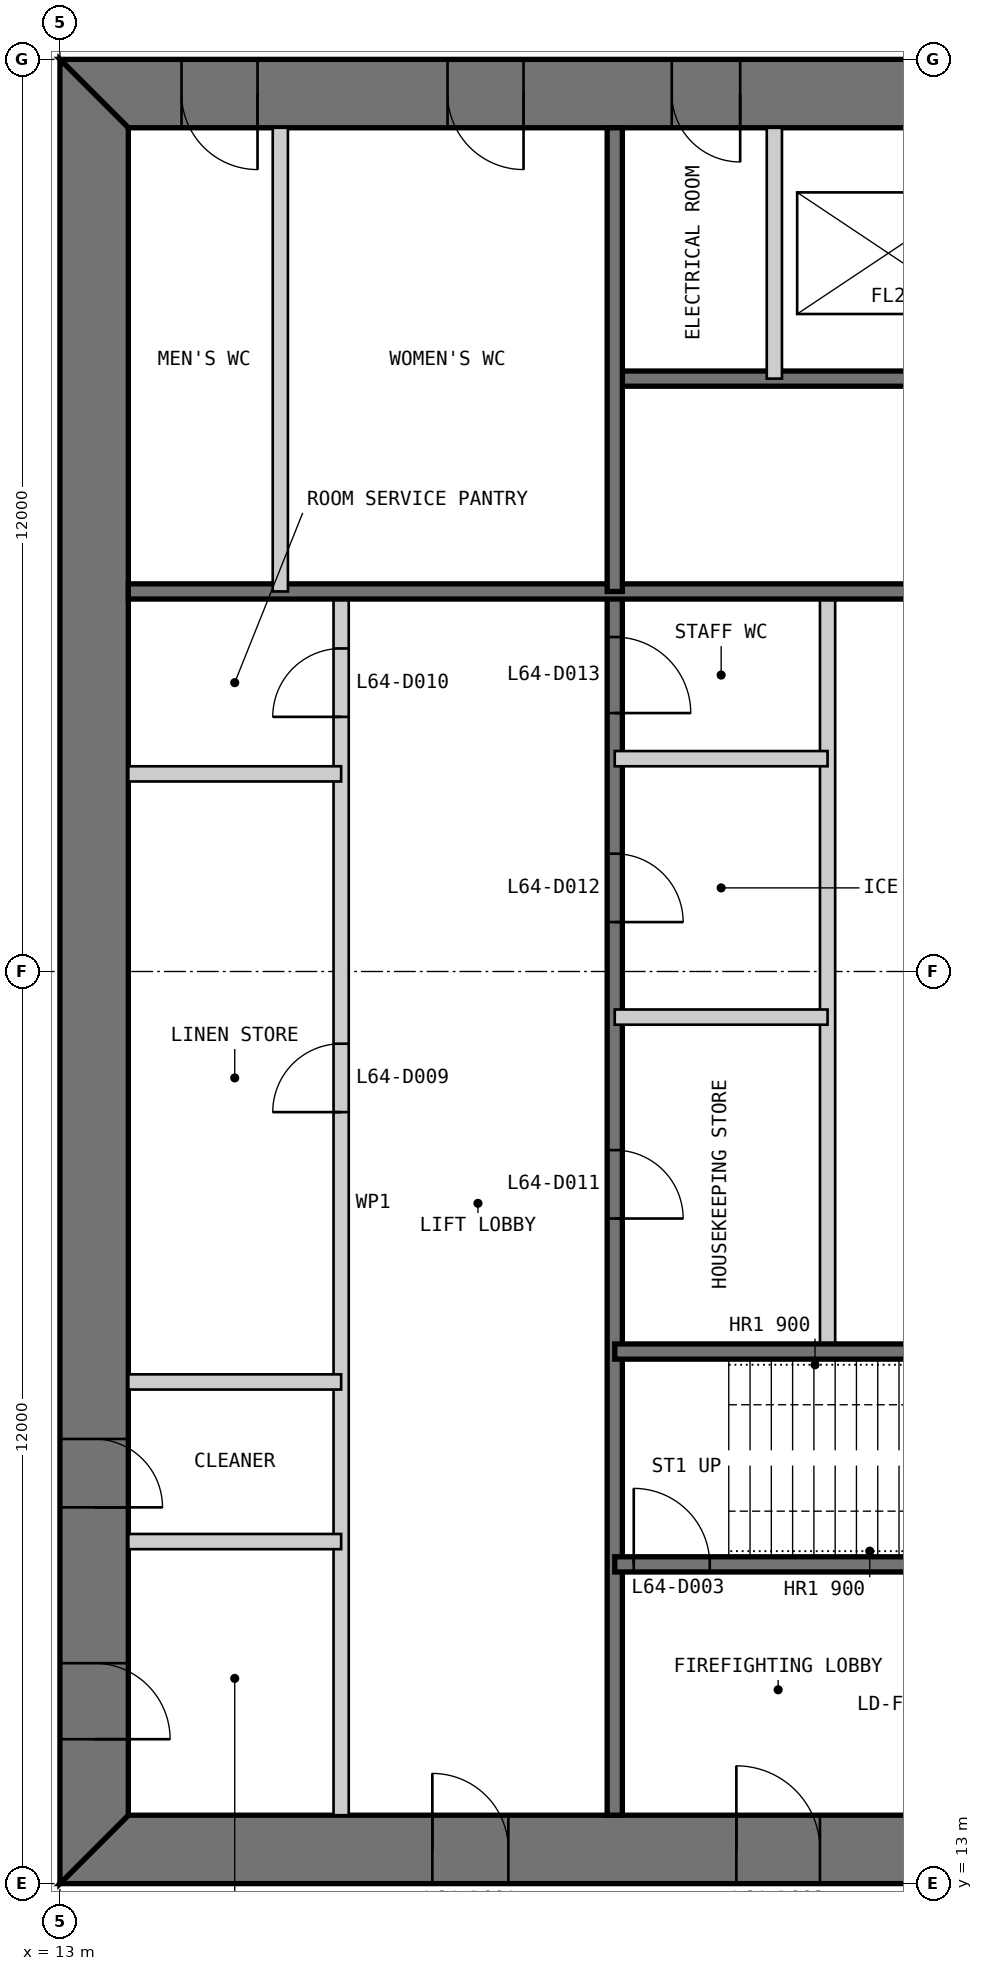
"""IFC4 building model, lengths in metres.
Left out: names, types, materials, properties, quantities, classifications, styles, units other than length and angle.
Written with IfcOpenShell. Run it as: python <this file> out.ifc"""

import sys

from ifc_helpers import new_model, si_unit, direction, frame, frame_2d, origin, place, context, subcontext, project, spatial, polyline, rectangle, outline, extrude, element, fill, save


model = new_model("IFC4")
c1 = context("Model", 3, precision=1e-05, world=origin(), true_north=direction((0.0, 1.0)))
c2 = subcontext(c1, "Body", "Model", "MODEL_VIEW")
j1 = project(units=[si_unit("LENGTHUNIT", "METRE"), si_unit("PLANEANGLEUNIT", "RADIAN")], contexts=[c1])
p1 = place(None, origin())
s1 = spatial("IfcSite", under=j1, at=p1, CompositionType="ELEMENT")
p2 = place(p1, origin())
s2 = spatial("IfcBuilding", under=s1, at=p2, CompositionType="ELEMENT")
p3 = place(p2, frame((0.0, 0.0, 269.6)))
s3 = spatial("IfcBuildingStorey", under=s2, at=p3, CompositionType="ELEMENT", Elevation=269.6)
p4 = place(p3, frame((13.0, 13.45, 0.0), z_axis=(0.0, 0.0, 1.0), x_axis=(1.0, 0.0, 0.0)))
e1 = element("IfcWall", 1, at=p4, inside=s3, PredefinedType="SHEAR", context=c2, shape_type="SweptSolid", body=[
    extrude(outline(polyline([(0.0, -0.45), (24.0, -0.45), (23.1, 0.45), (0.9, 0.45), (0.0, -0.45)])), origin(), (0.0, 0.0, 1.0), 3.4),
])
p5 = place(p4, frame((4.9, 0.0, 0.0)))
e2 = element("IfcOpeningElement", 2, at=p5, cuts=e1, PredefinedType="OPENING", context=c2, shape_type="SweptSolid", body=[
    extrude(rectangle(XDim=1.0, YDim=2.2, at=frame_2d((0.5, 1.1))), frame((0.0, 0.46, 0.0), z_axis=(0.0, -1.0, 0.0), x_axis=(1.0, 0.0, 0.0)), (0.0, 0.0, 1.0), 0.92),
])
p6 = place(p4, frame((8.9, 0.0, 0.0)))
e3 = element("IfcOpeningElement", 3, at=p6, cuts=e1, PredefinedType="OPENING", context=c2, shape_type="SweptSolid", body=[
    extrude(rectangle(XDim=1.1, YDim=2.2, at=frame_2d((0.55, 1.1))), frame((0.0, 0.46, 0.0), z_axis=(0.0, -1.0, 0.0), x_axis=(1.0, 0.0, 0.0)), (0.0, 0.0, 1.0), 0.92),
])
p7 = place(p4, frame((15.05, 0.0, 0.0)))
e4 = element("IfcOpeningElement", 4, at=p7, cuts=e1, PredefinedType="OPENING", context=c2, shape_type="SweptSolid", body=[
    extrude(rectangle(XDim=0.9, YDim=2.2, at=frame_2d((0.45, 1.1))), frame((0.0, 0.46, 0.0), z_axis=(0.0, -1.0, 0.0), x_axis=(1.0, 0.0, 0.0)), (0.0, 0.0, 1.0), 0.92),
])
p8 = place(p4, frame((17.9, 0.0, 0.0)))
e5 = element("IfcOpeningElement", 5, at=p8, cuts=e1, PredefinedType="OPENING", context=c2, shape_type="SweptSolid", body=[
    extrude(rectangle(XDim=1.0, YDim=2.2, at=frame_2d((0.5, 1.1))), frame((0.0, 0.46, 0.0), z_axis=(0.0, -1.0, 0.0), x_axis=(1.0, 0.0, 0.0)), (0.0, 0.0, 1.0), 0.92),
])
p9 = place(p4, frame((21.4, 0.0, 0.0)))
e6 = element("IfcOpeningElement", 6, at=p9, cuts=e1, PredefinedType="OPENING", context=c2, shape_type="SweptSolid", body=[
    extrude(rectangle(XDim=1.0, YDim=2.2, at=frame_2d((0.5, 1.1))), frame((0.0, 0.46, 0.0), z_axis=(0.0, -1.0, 0.0), x_axis=(1.0, 0.0, 0.0)), (0.0, 0.0, 1.0), 0.92),
])
p10 = place(p3, frame((37.0, 36.55, 0.0), z_axis=(0.0, 0.0, 1.0), x_axis=(-1.0, 0.0, 0.0)))
e7 = element("IfcWall", 7, at=p10, inside=s3, PredefinedType="SHEAR", context=c2, shape_type="SweptSolid", body=[
    extrude(outline(polyline([(0.0, -0.45), (24.0, -0.45), (23.1, 0.45), (0.9, 0.45), (0.0, -0.45)])), origin(), (0.0, 0.0, 1.0), 3.4),
])
p11 = place(p10, frame((4.9, 0.0, 0.0)))
e8 = element("IfcOpeningElement", 8, at=p11, cuts=e7, PredefinedType="OPENING", context=c2, shape_type="SweptSolid", body=[
    extrude(rectangle(XDim=1.0, YDim=2.2, at=frame_2d((0.5, 1.1))), frame((0.0, 0.46, 0.0), z_axis=(0.0, -1.0, 0.0), x_axis=(1.0, 0.0, 0.0)), (0.0, 0.0, 1.0), 0.92),
])
p12 = place(p10, frame((8.9, 0.0, 0.0)))
e9 = element("IfcOpeningElement", 9, at=p12, cuts=e7, PredefinedType="OPENING", context=c2, shape_type="SweptSolid", body=[
    extrude(rectangle(XDim=1.1, YDim=2.2, at=frame_2d((0.55, 1.1))), frame((0.0, 0.46, 0.0), z_axis=(0.0, -1.0, 0.0), x_axis=(1.0, 0.0, 0.0)), (0.0, 0.0, 1.0), 0.92),
])
p13 = place(p10, frame((15.05, 0.0, 0.0)))
e10 = element("IfcOpeningElement", 10, at=p13, cuts=e7, PredefinedType="OPENING", context=c2, shape_type="SweptSolid", body=[
    extrude(rectangle(XDim=0.9, YDim=2.2, at=frame_2d((0.45, 1.1))), frame((0.0, 0.46, 0.0), z_axis=(0.0, -1.0, 0.0), x_axis=(1.0, 0.0, 0.0)), (0.0, 0.0, 1.0), 0.92),
])
p14 = place(p10, frame((17.9, 0.0, 0.0)))
e11 = element("IfcOpeningElement", 11, at=p14, cuts=e7, PredefinedType="OPENING", context=c2, shape_type="SweptSolid", body=[
    extrude(rectangle(XDim=1.0, YDim=2.2, at=frame_2d((0.5, 1.1))), frame((0.0, 0.46, 0.0), z_axis=(0.0, -1.0, 0.0), x_axis=(1.0, 0.0, 0.0)), (0.0, 0.0, 1.0), 0.92),
])
p15 = place(p10, frame((21.4, 0.0, 0.0)))
e12 = element("IfcOpeningElement", 12, at=p15, cuts=e7, PredefinedType="OPENING", context=c2, shape_type="SweptSolid", body=[
    extrude(rectangle(XDim=1.0, YDim=2.2, at=frame_2d((0.5, 1.1))), frame((0.0, 0.46, 0.0), z_axis=(0.0, -1.0, 0.0), x_axis=(1.0, 0.0, 0.0)), (0.0, 0.0, 1.0), 0.92),
])
p16 = place(p3, frame((13.45, 36.1, 0.0), z_axis=(0.0, 0.0, 1.0), x_axis=(0.0, -1.0, 0.0)))
e13 = element("IfcWall", 13, at=p16, inside=s3, PredefinedType="SHEAR", context=c2, shape_type="SweptSolid", body=[
    extrude(outline(polyline([(-0.9, -0.45), (23.1, -0.45), (22.2, 0.45), (0.0, 0.45), (-0.9, -0.45)])), origin(), (0.0, 0.0, 1.0), 3.4),
])
p17 = place(p16, frame((20.2, 0.0, 0.0)))
e14 = element("IfcOpeningElement", 14, at=p17, cuts=e13, PredefinedType="OPENING", context=c2, shape_type="SweptSolid", body=[
    extrude(rectangle(XDim=1.0, YDim=2.2, at=frame_2d((0.5, 1.1))), frame((0.0, 0.46, 0.0), z_axis=(0.0, -1.0, 0.0), x_axis=(1.0, 0.0, 0.0)), (0.0, 0.0, 1.0), 0.92),
])
p18 = place(p16, frame((17.25, 0.0, 0.0)))
e15 = element("IfcOpeningElement", 15, at=p18, cuts=e13, PredefinedType="OPENING", context=c2, shape_type="SweptSolid", body=[
    extrude(rectangle(XDim=0.9, YDim=2.2, at=frame_2d((0.45, 1.1))), frame((0.0, 0.46, 0.0), z_axis=(0.0, -1.0, 0.0), x_axis=(1.0, 0.0, 0.0)), (0.0, 0.0, 1.0), 0.92),
])
p19 = place(p3, frame((16.7, 13.9, 0.0), z_axis=(0.0, 0.0, 1.0), x_axis=(0.0, 1.0, 0.0)))
e16 = element("IfcWall", 16, at=p19, inside=s3, PredefinedType="PARTITIONING", context=c2, shape_type="SweptSolid", body=[
    extrude(rectangle(XDim=16.1, YDim=0.2, at=frame_2d((8.05, 0.0))), origin(), (0.0, 0.0, 1.0), 3.2),
])
p20 = place(p19, frame((9.25, 0.0, 0.0)))
e17 = element("IfcOpeningElement", 17, at=p20, cuts=e16, PredefinedType="OPENING", context=c2, shape_type="SweptSolid", body=[
    extrude(rectangle(XDim=0.9, YDim=2.2, at=frame_2d((0.45, 1.1))), frame((0.0, 0.11, 0.0), z_axis=(0.0, -1.0, 0.0), x_axis=(1.0, 0.0, 0.0)), (0.0, 0.0, 1.0), 0.22),
])
p21 = place(p19, frame((14.45, 0.0, 0.0)))
e18 = element("IfcOpeningElement", 18, at=p21, cuts=e16, PredefinedType="OPENING", context=c2, shape_type="SweptSolid", body=[
    extrude(rectangle(XDim=0.9, YDim=2.2, at=frame_2d((0.45, 1.1))), frame((0.0, 0.11, 0.0), z_axis=(0.0, -1.0, 0.0), x_axis=(1.0, 0.0, 0.0)), (0.0, 0.0, 1.0), 0.22),
])
p22 = place(p3, frame((20.3, 13.9, 0.0), z_axis=(0.0, 0.0, 1.0), x_axis=(0.0, 1.0, 0.0)))
e19 = element("IfcWall", 19, at=p22, inside=s3, PredefinedType="SOLIDWALL", context=c2, shape_type="SweptSolid", body=[
    extrude(rectangle(XDim=16.1, YDim=0.2, at=frame_2d((8.05, 0.0))), origin(), (0.0, 0.0, 1.0), 3.2),
])
p23 = place(p22, frame((7.85, 0.0, 0.0)))
e20 = element("IfcOpeningElement", 20, at=p23, cuts=e19, PredefinedType="OPENING", context=c2, shape_type="SweptSolid", body=[
    extrude(rectangle(XDim=0.9, YDim=2.2, at=frame_2d((0.45, 1.1))), frame((0.0, 0.11, 0.0), z_axis=(0.0, -1.0, 0.0), x_axis=(1.0, 0.0, 0.0)), (0.0, 0.0, 1.0), 0.22),
])
p24 = place(p22, frame((11.75, 0.0, 0.0)))
e21 = element("IfcOpeningElement", 21, at=p24, cuts=e19, PredefinedType="OPENING", context=c2, shape_type="SweptSolid", body=[
    extrude(rectangle(XDim=0.9, YDim=2.2, at=frame_2d((0.45, 1.1))), frame((0.0, 0.11, 0.0), z_axis=(0.0, -1.0, 0.0), x_axis=(1.0, 0.0, 0.0)), (0.0, 0.0, 1.0), 0.22),
])
p25 = place(p22, frame((14.5, 0.0, 0.0)))
e22 = element("IfcOpeningElement", 22, at=p25, cuts=e19, PredefinedType="OPENING", context=c2, shape_type="SweptSolid", body=[
    extrude(rectangle(XDim=1.0, YDim=2.2, at=frame_2d((0.5, 1.1))), frame((0.0, 0.11, 0.0), z_axis=(0.0, -1.0, 0.0), x_axis=(1.0, 0.0, 0.0)), (0.0, 0.0, 1.0), 0.22),
])
p26 = place(p3, frame((23.1, 20.0, 0.0), z_axis=(0.0, 0.0, 1.0), x_axis=(0.0, 1.0, 0.0)))
e23 = element("IfcWall", 23, at=p26, inside=s3, PredefinedType="PARTITIONING", context=c2, shape_type="SweptSolid", body=[
    extrude(rectangle(XDim=10.0, YDim=0.2, at=frame_2d((5.0, 0.0))), origin(), (0.0, 0.0, 1.0), 3.2),
])
p27 = place(p3, frame((20.3, 17.2, 0.0), z_axis=(0.0, 0.0, 1.0), x_axis=(1.0, 0.0, 0.0)))
e24 = element("IfcWall", 24, at=p27, inside=s3, PredefinedType="SOLIDWALL", context=c2, shape_type="SweptSolid", body=[
    extrude(rectangle(XDim=9.4, YDim=0.2, at=frame_2d((4.7, 0.0))), origin(), (0.0, 0.0, 1.0), 3.2),
])
p28 = place(p27, frame((0.25, 0.0, 0.0)))
e25 = element("IfcOpeningElement", 25, at=p28, cuts=e24, PredefinedType="OPENING", context=c2, shape_type="SweptSolid", body=[
    extrude(rectangle(XDim=1.0, YDim=2.2, at=frame_2d((0.5, 1.1))), frame((0.0, 0.11, 0.0), z_axis=(0.0, -1.0, 0.0), x_axis=(1.0, 0.0, 0.0)), (0.0, 0.0, 1.0), 0.22),
])
p29 = place(p3, frame((20.3, 20.0, 0.0), z_axis=(0.0, 0.0, 1.0), x_axis=(1.0, 0.0, 0.0)))
e26 = element("IfcWall", 26, at=p29, inside=s3, PredefinedType="SOLIDWALL", context=c2, shape_type="SweptSolid", body=[
    extrude(rectangle(XDim=15.8, YDim=0.2, at=frame_2d((7.9, 0.0))), origin(), (0.0, 0.0, 1.0), 3.2),
])
for number, where, z_axis, x_axis in (
    (27, (13.9, 17.5, 0.0), (0.0, 0.0, 1.0), (1.0, 0.0, 0.0)),
    (28, (13.9, 19.6, 0.0), (0.0, 0.0, 1.0), (1.0, 0.0, 0.0)),
    (29, (13.9, 27.6, 0.0), (0.0, 0.0, 1.0), (1.0, 0.0, 0.0)),
    (30, (20.3, 24.4, 0.0), (0.0, 0.0, 1.0), (1.0, 0.0, 0.0)),
    (31, (20.3, 27.8, 0.0), (0.0, 0.0, 1.0), (1.0, 0.0, 0.0)),
):
    element("IfcWall", number, at=place(p3, frame(where, z_axis=z_axis, x_axis=x_axis)), inside=s3, PredefinedType="PARTITIONING", context=c2, shape_type="SweptSolid", body=[
        extrude(rectangle(XDim=2.8, YDim=0.2, at=frame_2d((1.4, 0.0))), origin(), (0.0, 0.0, 1.0), 3.2),
    ])
p30 = place(p3, frame((29.7, 32.8, 0.0), z_axis=(0.0, 0.0, 1.0), x_axis=(-1.0, 0.0, 0.0)))
e32 = element("IfcWall", 32, at=p30, inside=s3, PredefinedType="SOLIDWALL", context=c2, shape_type="SweptSolid", body=[
    extrude(rectangle(XDim=9.4, YDim=0.2, at=frame_2d((4.7, 0.0))), origin(), (0.0, 0.0, 1.0), 3.2),
])
p31 = place(p30, frame((0.25, 0.0, 0.0)))
e33 = element("IfcOpeningElement", 33, at=p31, cuts=e32, PredefinedType="OPENING", context=c2, shape_type="SweptSolid", body=[
    extrude(rectangle(XDim=1.0, YDim=2.2, at=frame_2d((0.5, 1.1))), frame((0.0, 0.11, 0.0), z_axis=(0.0, -1.0, 0.0), x_axis=(1.0, 0.0, 0.0)), (0.0, 0.0, 1.0), 0.22),
])
p32 = place(p3, frame((29.7, 30.0, 0.0), z_axis=(0.0, 0.0, 1.0), x_axis=(-1.0, 0.0, 0.0)))
e34 = element("IfcWall", 34, at=p32, inside=s3, PredefinedType="SOLIDWALL", context=c2, shape_type="SweptSolid", body=[
    extrude(rectangle(XDim=15.8, YDim=0.2, at=frame_2d((7.9, 0.0))), origin(), (0.0, 0.0, 1.0), 3.2),
])
p33 = place(p3, frame((22.4, 36.1, 0.0), z_axis=(0.0, 0.0, 1.0), x_axis=(0.0, -1.0, 0.0)))
e35 = element("IfcWall", 35, at=p33, inside=s3, PredefinedType="PARTITIONING", context=c2, shape_type="SweptSolid", body=[
    extrude(rectangle(XDim=3.3, YDim=0.2, at=frame_2d((1.65, 0.0))), origin(), (0.0, 0.0, 1.0), 3.2),
])
p34 = place(p3, frame((20.3, 36.1, 0.0), z_axis=(0.0, 0.0, 1.0), x_axis=(0.0, -1.0, 0.0)))
e36 = element("IfcWall", 36, at=p34, inside=s3, PredefinedType="SOLIDWALL", context=c2, shape_type="SweptSolid", body=[
    extrude(rectangle(XDim=6.1, YDim=0.2, at=frame_2d((3.05, 0.0))), origin(), (0.0, 0.0, 1.0), 3.2),
])
p35 = place(p3, frame((15.9, 36.1, 0.0), z_axis=(0.0, 0.0, 1.0), x_axis=(0.0, -1.0, 0.0)))
e37 = element("IfcWall", 37, at=p35, inside=s3, PredefinedType="PARTITIONING", context=c2, shape_type="SweptSolid", body=[
    extrude(rectangle(XDim=6.1, YDim=0.2, at=frame_2d((3.05, 0.0))), origin(), (0.0, 0.0, 1.0), 3.2),
])
p36 = place(p5, origin())
e38 = element("IfcDoor", 38, at=p36, inside=s3, OperationType="SINGLE_SWING_LEFT", PredefinedType="DOOR", context=c2, shape_type="SweptSolid", body=[
    extrude(rectangle(XDim=1.0, YDim=2.2, at=frame_2d((0.5, 1.1))), frame((0.0, 0.025, 0.0), z_axis=(0.0, -1.0, 0.0), x_axis=(1.0, 0.0, 0.0)), (0.0, 0.0, 1.0), 0.05),
    extrude(outline(polyline([(0.0, 0.0), (0.04, 0.0), (0.04, 2.16), (0.96, 2.16), (0.96, 0.0), (1.0, 0.0), (1.0, 2.2), (0.0, 2.2), (0.0, 0.0)])), frame((0.0, 0.3, 0.0), z_axis=(0.0, -1.0, 0.0), x_axis=(1.0, 0.0, 0.0)), (0.0, 0.0, 1.0), 0.6),
])
fill(e2, e38)
p37 = place(p6, origin())
e39 = element("IfcDoor", 39, at=p37, inside=s3, OperationType="SINGLE_SWING_LEFT", PredefinedType="DOOR", context=c2, shape_type="SweptSolid", body=[
    extrude(rectangle(XDim=1.1, YDim=2.2, at=frame_2d((0.55, 1.1))), frame((0.0, 0.025, 0.0), z_axis=(0.0, -1.0, 0.0), x_axis=(1.0, 0.0, 0.0)), (0.0, 0.0, 1.0), 0.05),
    extrude(outline(polyline([(0.0, 0.0), (0.04, 0.0), (0.04, 2.16), (1.06, 2.16), (1.06, 0.0), (1.1, 0.0), (1.1, 2.2), (0.0, 2.2), (0.0, 0.0)])), frame((0.0, 0.3, 0.0), z_axis=(0.0, -1.0, 0.0), x_axis=(1.0, 0.0, 0.0)), (0.0, 0.0, 1.0), 0.6),
])
fill(e3, e39)
p38 = place(p28, origin())
e40 = element("IfcDoor", 40, at=p38, inside=s3, OperationType="SINGLE_SWING_LEFT", PredefinedType="DOOR", context=c2, shape_type="SweptSolid", body=[
    extrude(rectangle(XDim=1.0, YDim=2.2, at=frame_2d((0.5, 1.1))), frame((0.0, 0.025, 0.0), z_axis=(0.0, -1.0, 0.0), x_axis=(1.0, 0.0, 0.0)), (0.0, 0.0, 1.0), 0.05),
])
fill(e25, e40)
p39 = place(p17, origin())
e41 = element("IfcDoor", 41, at=p39, inside=s3, OperationType="SINGLE_SWING_RIGHT", PredefinedType="DOOR", context=c2, shape_type="SweptSolid", body=[
    extrude(rectangle(XDim=1.0, YDim=2.2, at=frame_2d((0.5, 1.1))), frame((0.0, 0.025, 0.0), z_axis=(0.0, -1.0, 0.0), x_axis=(1.0, 0.0, 0.0)), (0.0, 0.0, 1.0), 0.05),
    extrude(outline(polyline([(0.0, 0.0), (0.04, 0.0), (0.04, 2.16), (0.96, 2.16), (0.96, 0.0), (1.0, 0.0), (1.0, 2.2), (0.0, 2.2), (0.0, 0.0)])), frame((0.0, 0.3, 0.0), z_axis=(0.0, -1.0, 0.0), x_axis=(1.0, 0.0, 0.0)), (0.0, 0.0, 1.0), 0.6),
])
fill(e14, e41)
p40 = place(p18, origin())
e42 = element("IfcDoor", 42, at=p40, inside=s3, OperationType="SINGLE_SWING_RIGHT", PredefinedType="DOOR", context=c2, shape_type="SweptSolid", body=[
    extrude(rectangle(XDim=0.9, YDim=2.2, at=frame_2d((0.45, 1.1))), frame((0.0, 0.025, 0.0), z_axis=(0.0, -1.0, 0.0), x_axis=(1.0, 0.0, 0.0)), (0.0, 0.0, 1.0), 0.05),
    extrude(outline(polyline([(0.0, 0.0), (0.04, 0.0), (0.04, 2.16), (0.86, 2.16), (0.86, 0.0), (0.9, 0.0), (0.9, 2.2), (0.0, 2.2), (0.0, 0.0)])), frame((0.0, 0.3, 0.0), z_axis=(0.0, -1.0, 0.0), x_axis=(1.0, 0.0, 0.0)), (0.0, 0.0, 1.0), 0.6),
])
fill(e15, e42)
p41 = place(p20, origin())
e43 = element("IfcDoor", 43, at=p41, inside=s3, OperationType="SINGLE_SWING_LEFT", PredefinedType="DOOR", context=c2, shape_type="SweptSolid", body=[
    extrude(rectangle(XDim=0.9, YDim=2.2, at=frame_2d((0.45, 1.1))), frame((0.0, 0.025, 0.0), z_axis=(0.0, -1.0, 0.0), x_axis=(1.0, 0.0, 0.0)), (0.0, 0.0, 1.0), 0.05),
])
fill(e17, e43)
p42 = place(p21, origin())
e44 = element("IfcDoor", 44, at=p42, inside=s3, OperationType="SINGLE_SWING_LEFT", PredefinedType="DOOR", context=c2, shape_type="SweptSolid", body=[
    extrude(rectangle(XDim=0.9, YDim=2.2, at=frame_2d((0.45, 1.1))), frame((0.0, 0.025, 0.0), z_axis=(0.0, -1.0, 0.0), x_axis=(1.0, 0.0, 0.0)), (0.0, 0.0, 1.0), 0.05),
])
fill(e18, e44)
p43 = place(p23, frame((0.9, 0.0, 0.0), z_axis=(0.0, 0.0, 1.0), x_axis=(-1.0, 0.0, 0.0)))
e45 = element("IfcDoor", 45, at=p43, inside=s3, OperationType="SINGLE_SWING_RIGHT", PredefinedType="DOOR", context=c2, shape_type="SweptSolid", body=[
    extrude(rectangle(XDim=0.9, YDim=2.2, at=frame_2d((0.45, 1.1))), frame((0.0, 0.025, 0.0), z_axis=(0.0, -1.0, 0.0), x_axis=(1.0, 0.0, 0.0)), (0.0, 0.0, 1.0), 0.05),
])
fill(e20, e45)
p44 = place(p24, frame((0.9, 0.0, 0.0), z_axis=(0.0, 0.0, 1.0), x_axis=(-1.0, 0.0, 0.0)))
e46 = element("IfcDoor", 46, at=p44, inside=s3, OperationType="SINGLE_SWING_RIGHT", PredefinedType="DOOR", context=c2, shape_type="SweptSolid", body=[
    extrude(rectangle(XDim=0.9, YDim=2.2, at=frame_2d((0.45, 1.1))), frame((0.0, 0.025, 0.0), z_axis=(0.0, -1.0, 0.0), x_axis=(1.0, 0.0, 0.0)), (0.0, 0.0, 1.0), 0.05),
])
fill(e21, e46)
p45 = place(p25, frame((1.0, 0.0, 0.0), z_axis=(0.0, 0.0, 1.0), x_axis=(-1.0, 0.0, 0.0)))
e47 = element("IfcDoor", 47, at=p45, inside=s3, OperationType="SINGLE_SWING_RIGHT", PredefinedType="DOOR", context=c2, shape_type="SweptSolid", body=[
    extrude(rectangle(XDim=1.0, YDim=2.2, at=frame_2d((0.5, 1.1))), frame((0.0, 0.025, 0.0), z_axis=(0.0, -1.0, 0.0), x_axis=(1.0, 0.0, 0.0)), (0.0, 0.0, 1.0), 0.05),
])
fill(e22, e47)
p46 = place(p13, origin())
e48 = element("IfcDoor", 48, at=p46, inside=s3, OperationType="SINGLE_SWING_LEFT", PredefinedType="DOOR", context=c2, shape_type="SweptSolid", body=[
    extrude(rectangle(XDim=0.9, YDim=2.2, at=frame_2d((0.45, 1.1))), frame((0.0, 0.025, 0.0), z_axis=(0.0, -1.0, 0.0), x_axis=(1.0, 0.0, 0.0)), (0.0, 0.0, 1.0), 0.05),
    extrude(outline(polyline([(0.0, 0.0), (0.04, 0.0), (0.04, 2.16), (0.86, 2.16), (0.86, 0.0), (0.9, 0.0), (0.9, 2.2), (0.0, 2.2), (0.0, 0.0)])), frame((0.0, 0.3, 0.0), z_axis=(0.0, -1.0, 0.0), x_axis=(1.0, 0.0, 0.0)), (0.0, 0.0, 1.0), 0.6),
])
fill(e10, e48)
p47 = place(p14, origin())
e49 = element("IfcDoor", 49, at=p47, inside=s3, OperationType="SINGLE_SWING_LEFT", PredefinedType="DOOR", context=c2, shape_type="SweptSolid", body=[
    extrude(rectangle(XDim=1.0, YDim=2.2, at=frame_2d((0.5, 1.1))), frame((0.0, 0.025, 0.0), z_axis=(0.0, -1.0, 0.0), x_axis=(1.0, 0.0, 0.0)), (0.0, 0.0, 1.0), 0.05),
    extrude(outline(polyline([(0.0, 0.0), (0.04, 0.0), (0.04, 2.16), (0.96, 2.16), (0.96, 0.0), (1.0, 0.0), (1.0, 2.2), (0.0, 2.2), (0.0, 0.0)])), frame((0.0, 0.3, 0.0), z_axis=(0.0, -1.0, 0.0), x_axis=(1.0, 0.0, 0.0)), (0.0, 0.0, 1.0), 0.6),
])
fill(e11, e49)
p48 = place(p15, origin())
e50 = element("IfcDoor", 50, at=p48, inside=s3, OperationType="SINGLE_SWING_LEFT", PredefinedType="DOOR", context=c2, shape_type="SweptSolid", body=[
    extrude(rectangle(XDim=1.0, YDim=2.2, at=frame_2d((0.5, 1.1))), frame((0.0, 0.025, 0.0), z_axis=(0.0, -1.0, 0.0), x_axis=(1.0, 0.0, 0.0)), (0.0, 0.0, 1.0), 0.05),
    extrude(outline(polyline([(0.0, 0.0), (0.04, 0.0), (0.04, 2.16), (0.96, 2.16), (0.96, 0.0), (1.0, 0.0), (1.0, 2.2), (0.0, 2.2), (0.0, 0.0)])), frame((0.0, 0.3, 0.0), z_axis=(0.0, -1.0, 0.0), x_axis=(1.0, 0.0, 0.0)), (0.0, 0.0, 1.0), 0.6),
])
fill(e12, e50)
save(model, sys.argv[1])
